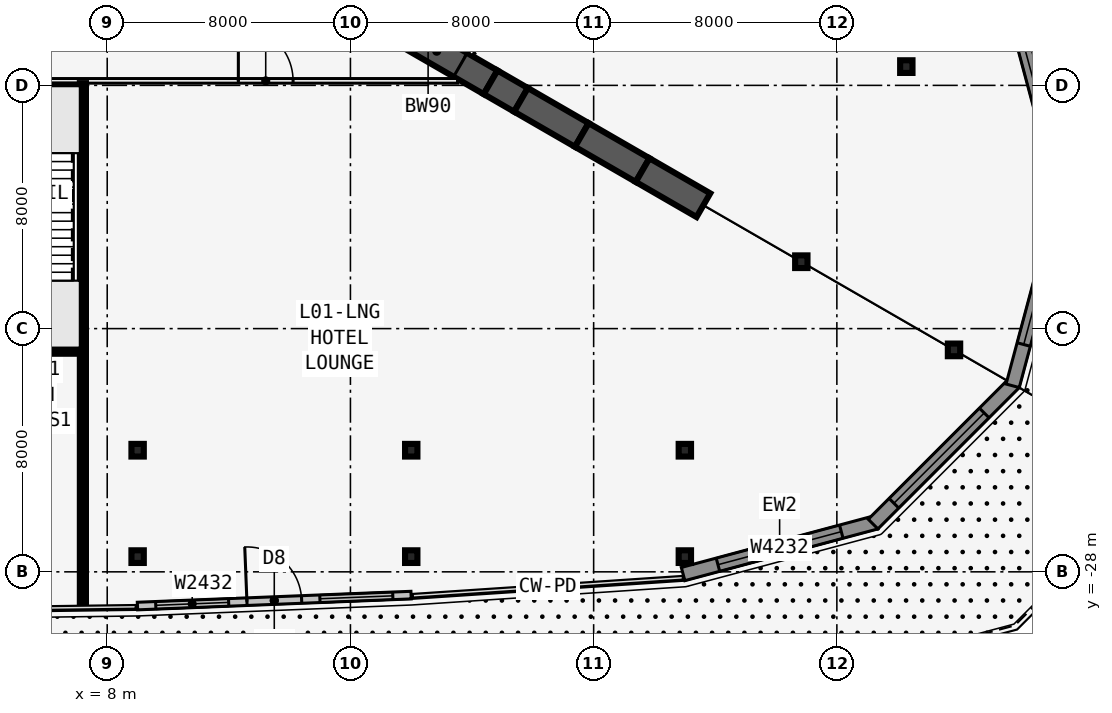
"""IFC4 building model, lengths in metres.
Left out: names, types, materials, properties, quantities, classifications, styles, units other than length and angle.
Written with IfcOpenShell. Run it as: python <this file> out.ifc"""

import sys

from ifc_helpers import new_model, si_unit, direction, frame, frame_2d, origin, origin_2d, place, context, subcontext, project, spatial, rectangle, i_section, extrude, element, fill, save


model = new_model("IFC4")
c1 = context("Model", 3, precision=1e-05, world=origin(), true_north=direction((0.0, 1.0)))
c2 = subcontext(c1, "Body", "Model", "MODEL_VIEW")
j1 = project(units=[si_unit("LENGTHUNIT", "METRE"), si_unit("PLANEANGLEUNIT", "RADIAN")], contexts=[c1])
p1 = place(None, origin())
s1 = spatial("IfcSite", under=j1, at=p1, CompositionType="ELEMENT")
p2 = place(p1, origin())
s2 = spatial("IfcBuilding", under=s1, at=p2, CompositionType="ELEMENT")
p3 = place(p2, frame((0.0, 0.0, 6.0)))
s3 = spatial("IfcBuildingStorey", under=s2, at=p3, CompositionType="ELEMENT", Elevation=6.0)
p4 = place(p3, frame((16.5, -9.526, 0.0), z_axis=(0.0, 0.0, 1.0), x_axis=(0.866031398331, -0.499989616998, 0.0)))
e1 = element("IfcWall", 1, at=p4, inside=s3, PredefinedType="SHEAR", context=c2, shape_type="SweptSolid", body=[
    extrude(rectangle(XDim=4.746, YDim=0.9, at=frame_2d((2.373, 0.0))), origin(), (0.0, 0.0, 1.0), 5.0),
])
p5 = place(p4, frame((1.8, 0.0, 0.0)))
e2 = element("IfcOpeningElement", 2, at=p5, cuts=e1, PredefinedType="OPENING", context=c2, shape_type="SweptSolid", body=[
    extrude(rectangle(XDim=1.8, YDim=2.13, at=frame_2d((0.9, 1.065))), frame((0.0, 0.46, 0.0), z_axis=(0.0, -1.0, 0.0), x_axis=(1.0, 0.0, 0.0)), (0.0, 0.0, 1.0), 0.92),
])
p6 = place(p3, frame((20.61, -11.899, 0.0), z_axis=(0.0, 0.0, 1.0), x_axis=(0.866009537788, -0.500027479704, 0.0)))
e3 = element("IfcWall", 3, at=p6, inside=s3, PredefinedType="SHEAR", context=c2, shape_type="SweptSolid", body=[
    extrude(rectangle(XDim=1.155, YDim=0.9, at=frame_2d((0.577, 0.0))), origin(), (0.0, 0.0, 1.0), 5.0),
])
for number, where, z_axis, x_axis in (
    (4, (21.61, -12.477, 0.0), (0.0, 0.0, 1.0), (0.866, -0.5, 0.0)),
    (5, (23.61, -13.631, 0.0), (0.0, 0.0, 1.0), (0.866, -0.5, 0.0)),
    (6, (25.61, -14.786, 0.0), (0.0, 0.0, 1.0), (0.866, -0.5, 0.0)),
):
    element("IfcWall", number, at=place(p3, frame(where, z_axis=z_axis, x_axis=x_axis)), inside=s3, PredefinedType="SHEAR", context=c2, shape_type="SweptSolid", body=[
        extrude(rectangle(XDim=2.309, YDim=0.9, at=frame_2d((1.155, 0.0))), origin(), (0.0, 0.0, 1.0), 5.0),
    ])
p7 = place(p3, frame((15.0, -20.303, 0.0), z_axis=(0.0, 0.0, 1.0), x_axis=(1.0, 0.0, 0.0)))
e7 = element("IfcColumn", 7, at=p7, inside=s3, PredefinedType="COLUMN", context=c2, shape_type="SweptSolid", body=[
    extrude(i_section(OverallWidth=0.455, OverallDepth=0.569, WebThickness=0.078, FlangeThickness=0.125, at=origin_2d()), origin(), (0.0, 0.0, 1.0), 5.0),
])
for number, where, z_axis, x_axis in (
    (8, (30.831, -17.8, 0.0), (0.0, 0.0, 1.0), (1.0, 0.0, 0.0)),
    (9, (35.854, -20.7, 0.0), (0.0, 0.0, 1.0), (1.0, 0.0, 0.0)),
    (10, (18.0, -24.0, 0.0), (0.0, 0.0, 1.0), (1.0, 0.0, 0.0)),
    (11, (27.0, -24.0, 0.0), (0.0, 0.0, 1.0), (1.0, 0.0, 0.0)),
    (12, (9.0, -24.0, 0.0), (0.0, 0.0, 1.0), (1.0, 0.0, 0.0)),
    (13, (34.285, -11.383, 0.0), (0.0, 0.0, 1.0), (1.0, 0.0, 0.0)),
    (14, (18.0, -27.5, 0.0), (0.0, 0.0, 1.0), (1.0, 0.0, 0.0)),
    (15, (27.0, -27.5, 0.0), (0.0, 0.0, 1.0), (1.0, 0.0, 0.0)),
    (16, (9.0, -27.5, 0.0), (0.0, 0.0, 1.0), (1.0, 0.0, 0.0)),
):
    element("IfcColumn", number, at=place(p3, frame(where, z_axis=z_axis, x_axis=x_axis)), inside=s3, PredefinedType="COLUMN", context=c2, shape_type="SweptSolid", body=[
        extrude(i_section(OverallWidth=0.406, OverallDepth=0.417, WebThickness=0.03, FlangeThickness=0.048, at=origin_2d()), origin(), (0.0, 0.0, 1.0), 5.0),
    ])
p8 = place(p3, frame((8.995, -29.125, 0.0), z_axis=(0.0, 0.0, 1.0), x_axis=(0.999201564791, 0.039952883748, 0.0)))
e17 = element("IfcWall", 17, at=p8, inside=s3, PredefinedType="STANDARD", context=c2, shape_type="SweptSolid", body=[
    extrude(rectangle(XDim=9.007, YDim=0.25, at=frame_2d((4.503, 0.0))), origin(), (0.0, 0.0, 1.0), 4.75),
])
p9 = place(p8, frame((3.604, 0.0, 0.0)))
e18 = element("IfcOpeningElement", 18, at=p9, cuts=e17, PredefinedType="OPENING", context=c2, shape_type="SweptSolid", body=[
    extrude(rectangle(XDim=1.8, YDim=2.4, at=frame_2d((0.9, 1.2))), frame((0.0, 0.135, 0.0), z_axis=(0.0, -1.0, 0.0), x_axis=(1.0, 0.0, 0.0)), (0.0, 0.0, 1.0), 0.27),
])
p10 = place(p8, frame((0.602, 0.0, 0.6)))
e19 = element("IfcOpeningElement", 19, at=p10, cuts=e17, PredefinedType="OPENING", context=c2, shape_type="SweptSolid", body=[
    extrude(rectangle(XDim=2.4, YDim=3.2, at=frame_2d((1.2, 1.6))), frame((0.0, 0.135, 0.0), z_axis=(0.0, -1.0, 0.0), x_axis=(1.0, 0.0, 0.0)), (0.0, 0.0, 1.0), 0.27),
])
p11 = place(p8, frame((6.005, 0.0, 0.6)))
e20 = element("IfcOpeningElement", 20, at=p11, cuts=e17, PredefinedType="OPENING", context=c2, shape_type="SweptSolid", body=[
    extrude(rectangle(XDim=2.4, YDim=3.2, at=frame_2d((1.2, 1.6))), frame((0.0, 0.135, 0.0), z_axis=(0.0, -1.0, 0.0), x_axis=(1.0, 0.0, 0.0)), (0.0, 0.0, 1.0), 0.27),
])
p12 = place(p3, frame((26.942, -28.073, 0.0), z_axis=(0.0, 0.0, 1.0), x_axis=(0.965918049854, 0.258848065411, 0.0)))
e21 = element("IfcWall", 21, at=p12, inside=s3, PredefinedType="SOLIDWALL", context=c2, shape_type="SweptSolid", body=[
    extrude(rectangle(XDim=6.575, YDim=0.45, at=frame_2d((3.288, 0.0))), origin(), (0.0, 0.0, 1.0), 4.75),
])
p13 = place(p12, frame((1.188, 0.0, 0.6)))
e22 = element("IfcOpeningElement", 22, at=p13, cuts=e21, PredefinedType="OPENING", context=c2, shape_type="SweptSolid", body=[
    extrude(rectangle(XDim=4.2, YDim=3.2, at=frame_2d((2.1, 1.6))), frame((0.0, 0.235, 0.0), z_axis=(0.0, -1.0, 0.0), x_axis=(1.0, 0.0, 0.0)), (0.0, 0.0, 1.0), 0.47),
])
p14 = place(p3, frame((33.192, -26.429, 0.0), z_axis=(0.0, 0.0, 1.0), x_axis=(0.7070882144, 0.707125347486, 0.0)))
e23 = element("IfcWall", 23, at=p14, inside=s3, PredefinedType="SOLIDWALL", context=c2, shape_type="SweptSolid", body=[
    extrude(rectangle(XDim=6.575, YDim=0.45, at=frame_2d((3.287, 0.0))), origin(), (0.0, 0.0, 1.0), 4.75),
])
p15 = place(p14, frame((0.969, 0.0, 0.6)))
e24 = element("IfcOpeningElement", 24, at=p15, cuts=e23, PredefinedType="OPENING", context=c2, shape_type="SweptSolid", body=[
    extrude(rectangle(XDim=4.2, YDim=3.2, at=frame_2d((2.1, 1.6))), frame((0.0, 0.235, 0.0), z_axis=(0.0, -1.0, 0.0), x_axis=(1.0, 0.0, 0.0)), (0.0, 0.0, 1.0), 0.47),
])
p16 = place(p3, frame((37.783, -21.881, 0.0), z_axis=(0.0, 0.0, 1.0), x_axis=(0.258813420722, 0.96592733332, 0.0)))
e25 = element("IfcWall", 25, at=p16, inside=s3, PredefinedType="SOLIDWALL", context=c2, shape_type="SweptSolid", body=[
    extrude(rectangle(XDim=6.575, YDim=0.45, at=frame_2d((3.288, 0.0))), origin(), (0.0, 0.0, 1.0), 4.75),
])
p17 = place(p16, frame((1.406, 0.0, 0.6)))
e26 = element("IfcOpeningElement", 26, at=p17, cuts=e25, PredefinedType="OPENING", context=c2, shape_type="SweptSolid", body=[
    extrude(rectangle(XDim=4.2, YDim=3.2, at=frame_2d((2.1, 1.6))), frame((0.0, 0.235, 0.0), z_axis=(0.0, -1.0, 0.0), x_axis=(1.0, 0.0, 0.0)), (0.0, 0.0, 1.0), 0.47),
])
p18 = place(p3, frame((39.484, -15.647, 0.0), z_axis=(0.0, 0.0, 1.0), x_axis=(-0.258813420722, 0.96592733332, 0.0)))
e27 = element("IfcWall", 27, at=p18, inside=s3, PredefinedType="SOLIDWALL", context=c2, shape_type="SweptSolid", body=[
    extrude(rectangle(XDim=6.575, YDim=0.45, at=frame_2d((3.288, 0.0))), origin(), (0.0, 0.0, 1.0), 4.75),
])
p19 = place(p18, frame((1.188, 0.0, 0.6)))
e28 = element("IfcOpeningElement", 28, at=p19, cuts=e27, PredefinedType="OPENING", context=c2, shape_type="SweptSolid", body=[
    extrude(rectangle(XDim=4.2, YDim=3.2, at=frame_2d((2.1, 1.6))), frame((0.0, 0.235, 0.0), z_axis=(0.0, -1.0, 0.0), x_axis=(1.0, 0.0, 0.0)), (0.0, 0.0, 1.0), 0.47),
])
p20 = place(p3, frame((-19.527, -11.851, 0.0), z_axis=(0.0, 0.0, 1.0), x_axis=(1.0, 0.0, 0.0)))
e29 = element("IfcWall", 29, at=p20, inside=s3, PredefinedType="PARTITIONING", context=c2, shape_type="SweptSolid", body=[
    extrude(rectangle(XDim=39.054, YDim=0.15, at=frame_2d((19.527, 0.0))), origin(), (0.0, 0.0, 1.0), 3.808),
])
p21 = place(p20, frame((8.013, 0.0, 0.0)))
e30 = element("IfcOpeningElement", 30, at=p21, cuts=e29, PredefinedType="OPENING", context=c2, shape_type="SweptSolid", body=[
    extrude(rectangle(XDim=1.8, YDim=2.13, at=frame_2d((0.9, 1.065))), frame((0.0, 0.085, 0.0), z_axis=(0.0, -1.0, 0.0), x_axis=(1.0, 0.0, 0.0)), (0.0, 0.0, 1.0), 0.17),
])
p22 = place(p20, frame((18.627, 0.0, 0.0)))
e31 = element("IfcOpeningElement", 31, at=p22, cuts=e29, PredefinedType="OPENING", context=c2, shape_type="SweptSolid", body=[
    extrude(rectangle(XDim=1.8, YDim=2.13, at=frame_2d((0.9, 1.065))), frame((0.0, 0.085, 0.0), z_axis=(0.0, -1.0, 0.0), x_axis=(1.0, 0.0, 0.0)), (0.0, 0.0, 1.0), 0.17),
])
p23 = place(p20, frame((23.227, 0.0, 0.0)))
e32 = element("IfcOpeningElement", 32, at=p23, cuts=e29, PredefinedType="OPENING", context=c2, shape_type="SweptSolid", body=[
    extrude(rectangle(XDim=1.8, YDim=2.13, at=frame_2d((0.9, 1.065))), frame((0.0, 0.085, 0.0), z_axis=(0.0, -1.0, 0.0), x_axis=(1.0, 0.0, 0.0)), (0.0, 0.0, 1.0), 0.17),
])
p24 = place(p20, frame((31.841, 0.0, 0.0)))
e33 = element("IfcOpeningElement", 33, at=p24, cuts=e29, PredefinedType="OPENING", context=c2, shape_type="SweptSolid", body=[
    extrude(rectangle(XDim=1.8, YDim=2.13, at=frame_2d((0.9, 1.065))), frame((0.0, 0.085, 0.0), z_axis=(0.0, -1.0, 0.0), x_axis=(1.0, 0.0, 0.0)), (0.0, 0.0, 1.0), 0.17),
])
p25 = place(p3, frame((7.2, -11.926, 0.0), z_axis=(0.0, 0.0, 1.0), x_axis=(0.0, -1.0, 0.0)))
e34 = element("IfcWall", 34, at=p25, inside=s3, PredefinedType="SHEAR", context=c2, shape_type="SweptSolid", body=[
    extrude(rectangle(XDim=17.167, YDim=0.2, at=frame_2d((8.583, 0.0))), origin(), (0.0, 0.0, 1.0), 5.0),
])
p26 = place(p3, frame((20.027, -10.985, 0.0), z_axis=(0.0, 0.0, 1.0), x_axis=(-0.500001677587, 0.866024435227, 0.0)))
e35 = element("IfcWall", 35, at=p26, inside=s3, PredefinedType="PARTITIONING", context=c2, shape_type="SweptSolid", body=[
    extrude(rectangle(XDim=39.054, YDim=0.15, at=frame_2d((19.527, 0.0))), origin(), (0.0, 0.0, 1.0), 3.808),
])
p27 = place(p26, frame((10.013, 0.0, 0.0)))
e36 = element("IfcOpeningElement", 36, at=p27, cuts=e35, PredefinedType="OPENING", context=c2, shape_type="SweptSolid", body=[
    extrude(rectangle(XDim=1.8, YDim=2.13, at=frame_2d((0.9, 1.065))), frame((0.0, 0.085, 0.0), z_axis=(0.0, -1.0, 0.0), x_axis=(1.0, 0.0, 0.0)), (0.0, 0.0, 1.0), 0.17),
])
p28 = place(p26, frame((23.227, 0.0, 0.0)))
e37 = element("IfcOpeningElement", 37, at=p28, cuts=e35, PredefinedType="OPENING", context=c2, shape_type="SweptSolid", body=[
    extrude(rectangle(XDim=1.8, YDim=2.13, at=frame_2d((0.9, 1.065))), frame((0.0, 0.085, 0.0), z_axis=(0.0, -1.0, 0.0), x_axis=(1.0, 0.0, 0.0)), (0.0, 0.0, 1.0), 0.17),
])
p29 = place(p26, frame((27.627, 0.0, 0.0)))
e38 = element("IfcOpeningElement", 38, at=p29, cuts=e35, PredefinedType="OPENING", context=c2, shape_type="SweptSolid", body=[
    extrude(rectangle(XDim=1.0, YDim=2.13, at=frame_2d((0.5, 1.065))), frame((0.0, 0.085, 0.0), z_axis=(0.0, -1.0, 0.0), x_axis=(1.0, 0.0, 0.0)), (0.0, 0.0, 1.0), 0.17),
])
p30 = place(p26, frame((30.527, 0.0, 0.0)))
e39 = element("IfcOpeningElement", 39, at=p30, cuts=e35, PredefinedType="OPENING", context=c2, shape_type="SweptSolid", body=[
    extrude(rectangle(XDim=1.0, YDim=2.13, at=frame_2d((0.5, 1.065))), frame((0.0, 0.085, 0.0), z_axis=(0.0, -1.0, 0.0), x_axis=(1.0, 0.0, 0.0)), (0.0, 0.0, 1.0), 0.17),
])
p31 = place(p26, frame((33.277, 0.0, 0.0)))
e40 = element("IfcOpeningElement", 40, at=p31, cuts=e35, PredefinedType="OPENING", context=c2, shape_type="SweptSolid", body=[
    extrude(rectangle(XDim=1.0, YDim=2.13, at=frame_2d((0.5, 1.065))), frame((0.0, 0.085, 0.0), z_axis=(0.0, -1.0, 0.0), x_axis=(1.0, 0.0, 0.0)), (0.0, 0.0, 1.0), 0.17),
])
p32 = place(p26, frame((36.39, 0.0, 0.0)))
e41 = element("IfcOpeningElement", 41, at=p32, cuts=e35, PredefinedType="OPENING", context=c2, shape_type="SweptSolid", body=[
    extrude(rectangle(XDim=1.0, YDim=2.13, at=frame_2d((0.5, 1.065))), frame((0.0, 0.085, 0.0), z_axis=(0.0, -1.0, 0.0), x_axis=(1.0, 0.0, 0.0)), (0.0, 0.0, 1.0), 0.17),
])
p33 = place(p3, frame((2.0, -20.726, 0.0), z_axis=(0.0, 0.0, 1.0), x_axis=(1.0, 0.0, 0.0)))
e42 = element("IfcWall", 42, at=p33, inside=s3, PredefinedType="SHEAR", context=c2, shape_type="SweptSolid", body=[
    extrude(rectangle(XDim=5.2, YDim=0.2, at=frame_2d((2.6, 0.0))), origin(), (0.0, 0.0, 1.0), 5.0),
])
p34 = place(p3, frame((5.6, -11.976, 0.0), z_axis=(0.0, 0.0, 1.0), x_axis=(1.0, 0.0, 0.0)))
e43 = element("IfcWall", 43, at=p34, inside=s3, PredefinedType="SOLIDWALL", context=c2, shape_type="SweptSolid", body=[
    extrude(rectangle(XDim=1.5, YDim=0.1, at=frame_2d((0.75, 0.0))), origin(), (0.0, 0.0, 1.0), 5.0),
])
p35 = place(p9, origin())
e44 = element("IfcDoor", 44, at=p35, inside=s3, OperationType="DOUBLE_DOOR_SINGLE_SWING", PredefinedType="DOOR", context=c2, shape_type="SweptSolid", body=[
    extrude(rectangle(XDim=1.8, YDim=2.4, at=frame_2d((0.9, 1.2))), frame((0.0, 0.025, 0.0), z_axis=(0.0, -1.0, 0.0), x_axis=(1.0, 0.0, 0.0)), (0.0, 0.0, 1.0), 0.05),
])
fill(e18, e44)
p36 = place(p10, origin())
e45 = element("IfcWindow", 45, at=p36, inside=s3, PartitioningType="SINGLE_PANEL", PredefinedType="WINDOW", context=c2, shape_type="SweptSolid", body=[
    extrude(rectangle(XDim=2.4, YDim=3.2, at=frame_2d((1.2, 1.6))), frame((0.0, 0.03, 0.0), z_axis=(0.0, -1.0, 0.0), x_axis=(1.0, 0.0, 0.0)), (0.0, 0.0, 1.0), 0.06),
])
fill(e19, e45)
p37 = place(p11, origin())
e46 = element("IfcWindow", 46, at=p37, inside=s3, PartitioningType="SINGLE_PANEL", PredefinedType="WINDOW", context=c2, shape_type="SweptSolid", body=[
    extrude(rectangle(XDim=2.4, YDim=3.2, at=frame_2d((1.2, 1.6))), frame((0.0, 0.03, 0.0), z_axis=(0.0, -1.0, 0.0), x_axis=(1.0, 0.0, 0.0)), (0.0, 0.0, 1.0), 0.06),
])
fill(e20, e46)
p38 = place(p13, origin())
e47 = element("IfcWindow", 47, at=p38, inside=s3, PartitioningType="SINGLE_PANEL", PredefinedType="WINDOW", context=c2, shape_type="SweptSolid", body=[
    extrude(rectangle(XDim=4.2, YDim=3.2, at=frame_2d((2.1, 1.6))), frame((0.0, 0.03, 0.0), z_axis=(0.0, -1.0, 0.0), x_axis=(1.0, 0.0, 0.0)), (0.0, 0.0, 1.0), 0.06),
])
fill(e22, e47)
p39 = place(p15, origin())
e48 = element("IfcWindow", 48, at=p39, inside=s3, PartitioningType="SINGLE_PANEL", PredefinedType="WINDOW", context=c2, shape_type="SweptSolid", body=[
    extrude(rectangle(XDim=4.2, YDim=3.2, at=frame_2d((2.1, 1.6))), frame((0.0, 0.03, 0.0), z_axis=(0.0, -1.0, 0.0), x_axis=(1.0, 0.0, 0.0)), (0.0, 0.0, 1.0), 0.06),
])
fill(e24, e48)
p40 = place(p17, origin())
e49 = element("IfcWindow", 49, at=p40, inside=s3, PartitioningType="SINGLE_PANEL", PredefinedType="WINDOW", context=c2, shape_type="SweptSolid", body=[
    extrude(rectangle(XDim=4.2, YDim=3.2, at=frame_2d((2.1, 1.6))), frame((0.0, 0.03, 0.0), z_axis=(0.0, -1.0, 0.0), x_axis=(1.0, 0.0, 0.0)), (0.0, 0.0, 1.0), 0.06),
])
fill(e26, e49)
p41 = place(p19, origin())
e50 = element("IfcWindow", 50, at=p41, inside=s3, PartitioningType="SINGLE_PANEL", PredefinedType="WINDOW", context=c2, shape_type="SweptSolid", body=[
    extrude(rectangle(XDim=4.2, YDim=3.2, at=frame_2d((2.1, 1.6))), frame((0.0, 0.03, 0.0), z_axis=(0.0, -1.0, 0.0), x_axis=(1.0, 0.0, 0.0)), (0.0, 0.0, 1.0), 0.06),
])
fill(e28, e50)
p42 = place(p24, origin())
e51 = element("IfcDoor", 51, at=p42, inside=s3, OperationType="DOUBLE_DOOR_SINGLE_SWING", PredefinedType="DOOR", context=c2, shape_type="SweptSolid", body=[
    extrude(rectangle(XDim=1.8, YDim=2.13, at=frame_2d((0.9, 1.065))), frame((0.0, 0.025, 0.0), z_axis=(0.0, -1.0, 0.0), x_axis=(1.0, 0.0, 0.0)), (0.0, 0.0, 1.0), 0.05),
])
fill(e33, e51)
p43 = place(p5, origin())
e52 = element("IfcDoor", 52, at=p43, inside=s3, OperationType="DOUBLE_DOOR_DOUBLE_SWING", PredefinedType="DOOR", context=c2, shape_type="SweptSolid", body=[
    extrude(rectangle(XDim=1.8, YDim=2.13, at=frame_2d((0.9, 1.065))), frame((0.0, 0.025, 0.0), z_axis=(0.0, -1.0, 0.0), x_axis=(1.0, 0.0, 0.0)), (0.0, 0.0, 1.0), 0.05),
])
fill(e2, e52)
save(model, sys.argv[1])
